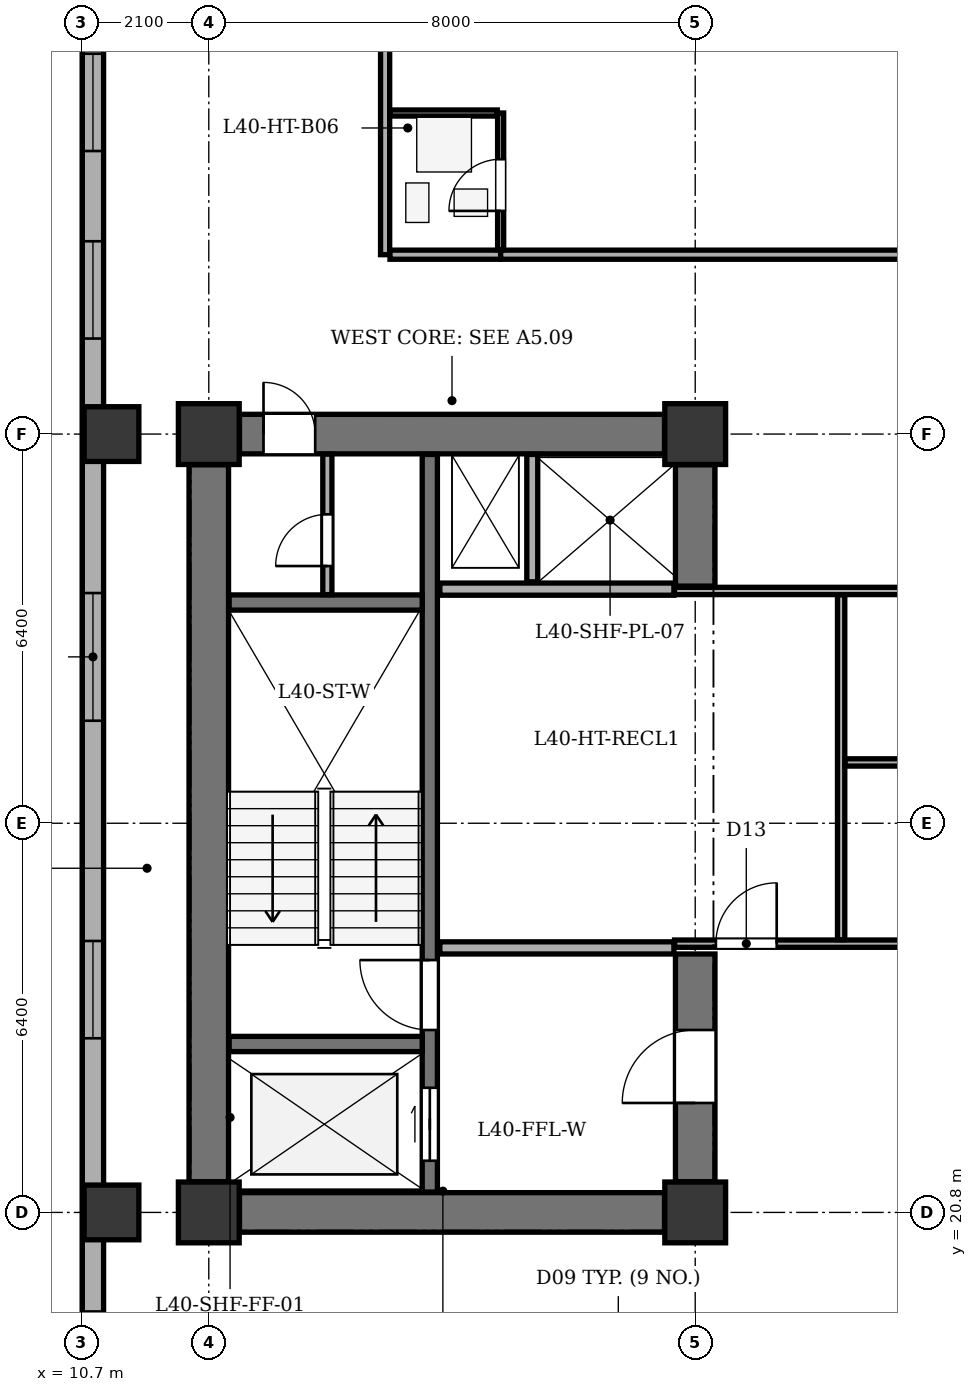
"""IFC4 building model, lengths in metres.
Left out: names, types, materials, properties, quantities, classifications, styles, units other than length and angle.
Written with IfcOpenShell. Run it as: python <this file> out.ifc"""

import sys

from ifc_helpers import new_model, si_unit, direction, frame, frame_2d, origin, origin_2d, place, context, subcontext, project, spatial, rectangle, extrude, element, fill, save


model = new_model("IFC4")
c1 = context("Model", 3, precision=1e-05, world=origin(), true_north=direction((0.0, 1.0)))
c2 = subcontext(c1, "Body", "Model", "MODEL_VIEW")
j1 = project(units=[si_unit("LENGTHUNIT", "METRE"), si_unit("PLANEANGLEUNIT", "RADIAN")], contexts=[c1])
p1 = place(None, origin())
s1 = spatial("IfcSite", under=j1, at=p1, CompositionType="ELEMENT")
p2 = place(p1, origin())
s2 = spatial("IfcBuilding", under=s1, at=p2, CompositionType="ELEMENT")
p3 = place(p2, frame((0.0, 0.0, 158.8)))
s3 = spatial("IfcBuildingStorey", under=s2, at=p3, CompositionType="ELEMENT", Elevation=158.8)
for number, where, z_axis, x_axis in (
    (1, (12.8, 20.8, 0.0), (0.0, 0.0, 1.0), (1.0, 0.0, 0.0)),
    (2, (20.8, 20.8, 0.0), (0.0, 0.0, 1.0), (1.0, 0.0, 0.0)),
    (3, (12.8, 33.6, 0.0), (0.0, 0.0, 1.0), (1.0, 0.0, 0.0)),
    (4, (20.8, 33.6, 0.0), (0.0, 0.0, 1.0), (1.0, 0.0, 0.0)),
):
    element("IfcColumn", number, at=place(p3, frame(where, z_axis=z_axis, x_axis=x_axis)), inside=s3, PredefinedType="COLUMN", context=c2, shape_type="SweptSolid", body=[
        extrude(rectangle(XDim=1.0, YDim=1.0, at=origin_2d()), origin(), (0.0, 0.0, 1.0), 3.5),
    ])
for number, where, z_axis, x_axis in (
    (5, (11.2, 20.8, 0.0), (0.0, 0.0, 1.0), (1.0, 0.0, 0.0)),
    (6, (11.2, 33.6, 0.0), (0.0, 0.0, 1.0), (1.0, 0.0, 0.0)),
):
    element("IfcColumn", number, at=place(p3, frame(where, z_axis=z_axis, x_axis=x_axis)), inside=s3, PredefinedType="COLUMN", context=c2, shape_type="SweptSolid", body=[
        extrude(rectangle(XDim=0.9, YDim=0.9, at=origin_2d()), origin(), (0.0, 0.0, 1.0), 3.5),
    ])
p4 = place(p3, frame((10.895, 6.5, 0.0), z_axis=(0.0, 0.0, 1.0), x_axis=(0.0, 1.0, 0.0)))
e7 = element("IfcWall", 7, at=p4, inside=s3, PredefinedType="STANDARD", context=c2, shape_type="SweptSolid", body=[
    extrude(rectangle(XDim=35.0, YDim=0.35, at=frame_2d((17.5, 0.0))), origin(), (0.0, 0.0, 1.0), 2.435),
])
p5 = place(p4, frame((2.513, 0.0, 0.75)))
e8 = element("IfcOpeningElement", 8, at=p5, cuts=e7, PredefinedType="OPENING", context=c2, shape_type="SweptSolid", body=[
    extrude(rectangle(XDim=1.6, YDim=1.565, at=frame_2d((0.8, 0.782))), frame((0.0, 0.185, 0.0), z_axis=(0.0, -1.0, 0.0), x_axis=(1.0, 0.0, 0.0)), (0.0, 0.0, 1.0), 0.37),
])
p6 = place(p4, frame((7.879, 0.0, 0.75)))
e9 = element("IfcOpeningElement", 9, at=p6, cuts=e7, PredefinedType="OPENING", context=c2, shape_type="SweptSolid", body=[
    extrude(rectangle(XDim=1.6, YDim=1.565, at=frame_2d((0.8, 0.782))), frame((0.0, 0.185, 0.0), z_axis=(0.0, -1.0, 0.0), x_axis=(1.0, 0.0, 0.0)), (0.0, 0.0, 1.0), 0.37),
])
p7 = place(p4, frame((11.071, 0.0, 0.75)))
e10 = element("IfcOpeningElement", 10, at=p7, cuts=e7, PredefinedType="OPENING", context=c2, shape_type="SweptSolid", body=[
    extrude(rectangle(XDim=1.6, YDim=1.565, at=frame_2d((0.8, 0.782))), frame((0.0, 0.185, 0.0), z_axis=(0.0, -1.0, 0.0), x_axis=(1.0, 0.0, 0.0)), (0.0, 0.0, 1.0), 0.37),
])
p8 = place(p4, frame((17.164, 0.0, 0.75)))
e11 = element("IfcOpeningElement", 11, at=p8, cuts=e7, PredefinedType="OPENING", context=c2, shape_type="SweptSolid", body=[
    extrude(rectangle(XDim=1.6, YDim=1.565, at=frame_2d((0.8, 0.782))), frame((0.0, 0.185, 0.0), z_axis=(0.0, -1.0, 0.0), x_axis=(1.0, 0.0, 0.0)), (0.0, 0.0, 1.0), 0.37),
])
p9 = place(p4, frame((22.386, 0.0, 0.75)))
e12 = element("IfcOpeningElement", 12, at=p9, cuts=e7, PredefinedType="OPENING", context=c2, shape_type="SweptSolid", body=[
    extrude(rectangle(XDim=2.1, YDim=1.565, at=frame_2d((1.05, 0.782))), frame((0.0, 0.185, 0.0), z_axis=(0.0, -1.0, 0.0), x_axis=(1.0, 0.0, 0.0)), (0.0, 0.0, 1.0), 0.37),
])
p10 = place(p4, frame((28.671, 0.0, 0.75)))
e13 = element("IfcOpeningElement", 13, at=p10, cuts=e7, PredefinedType="OPENING", context=c2, shape_type="SweptSolid", body=[
    extrude(rectangle(XDim=1.6, YDim=1.565, at=frame_2d((0.8, 0.782))), frame((0.0, 0.185, 0.0), z_axis=(0.0, -1.0, 0.0), x_axis=(1.0, 0.0, 0.0)), (0.0, 0.0, 1.0), 0.37),
])
p11 = place(p4, frame((31.755, 0.0, 0.75)))
e14 = element("IfcOpeningElement", 14, at=p11, cuts=e7, PredefinedType="OPENING", context=c2, shape_type="SweptSolid", body=[
    extrude(rectangle(XDim=1.6, YDim=1.565, at=frame_2d((0.8, 0.782))), frame((0.0, 0.185, 0.0), z_axis=(0.0, -1.0, 0.0), x_axis=(1.0, 0.0, 0.0)), (0.0, 0.0, 1.0), 0.37),
])
p12 = place(p3, frame((12.8, 21.305, 0.0), z_axis=(0.0, 0.0, 1.0), x_axis=(0.0, 1.0, 0.0)))
e15 = element("IfcWall", 15, at=p12, inside=s3, PredefinedType="SHEAR", context=c2, shape_type="SweptSolid", body=[
    extrude(rectangle(XDim=11.79, YDim=0.65, at=frame_2d((5.895, 0.0))), origin(), (0.0, 0.0, 1.0), 3.05),
])
p13 = place(p3, frame((13.305, 20.8, 0.0), z_axis=(0.0, 0.0, 1.0), x_axis=(1.0, 0.0, 0.0)))
e16 = element("IfcWall", 16, at=p13, inside=s3, PredefinedType="SHEAR", context=c2, shape_type="SweptSolid", body=[
    extrude(rectangle(XDim=6.99, YDim=0.65, at=frame_2d((3.495, 0.0))), origin(), (0.0, 0.0, 1.0), 3.05),
])
p14 = place(p3, frame((13.305, 33.6, 0.0), z_axis=(0.0, 0.0, 1.0), x_axis=(1.0, 0.0, 0.0)))
e17 = element("IfcWall", 17, at=p14, inside=s3, PredefinedType="SHEAR", context=c2, shape_type="SweptSolid", body=[
    extrude(rectangle(XDim=6.99, YDim=0.65, at=frame_2d((3.495, 0.0))), origin(), (0.0, 0.0, 1.0), 3.05),
])
p15 = place(p14, frame((0.395, 0.0, 0.0)))
e18 = element("IfcOpeningElement", 18, at=p15, cuts=e17, PredefinedType="OPENING", context=c2, shape_type="SweptSolid", body=[
    extrude(rectangle(XDim=0.85, YDim=2.02, at=frame_2d((0.425, 1.01))), frame((0.0, 0.335, 0.0), z_axis=(0.0, -1.0, 0.0), x_axis=(1.0, 0.0, 0.0)), (0.0, 0.0, 1.0), 0.67),
])
p16 = place(p3, frame((20.8, 21.305, 0.0), z_axis=(0.0, 0.0, 1.0), x_axis=(0.0, 1.0, 0.0)))
e19 = element("IfcWall", 19, at=p16, inside=s3, PredefinedType="SHEAR", context=c2, shape_type="SweptSolid", body=[
    extrude(rectangle(XDim=3.745, YDim=0.65, at=frame_2d((1.873, 0.0))), origin(), (0.0, 0.0, 1.0), 3.05),
])
p17 = place(p16, frame((1.295, 0.0, 0.0)))
e20 = element("IfcOpeningElement", 20, at=p17, cuts=e19, PredefinedType="OPENING", context=c2, shape_type="SweptSolid", body=[
    extrude(rectangle(XDim=1.2, YDim=2.15, at=frame_2d((0.6, 1.075))), frame((0.0, 0.335, 0.0), z_axis=(0.0, -1.0, 0.0), x_axis=(1.0, 0.0, 0.0)), (0.0, 0.0, 1.0), 0.67),
])
p18 = place(p3, frame((20.8, 31.1, 0.0), z_axis=(0.0, 0.0, 1.0), x_axis=(0.0, 1.0, 0.0)))
e21 = element("IfcWall", 21, at=p18, inside=s3, PredefinedType="SHEAR", context=c2, shape_type="SweptSolid", body=[
    extrude(rectangle(XDim=1.995, YDim=0.65, at=frame_2d((0.998, 0.0))), origin(), (0.0, 0.0, 1.0), 3.05),
])
p19 = place(p3, frame((16.435, 21.135, 0.0), z_axis=(0.0, 0.0, 1.0), x_axis=(0.0, 1.0, 0.0)))
e22 = element("IfcWall", 22, at=p19, inside=s3, PredefinedType="SHEAR", context=c2, shape_type="SweptSolid", body=[
    extrude(rectangle(XDim=12.13, YDim=0.25, at=frame_2d((6.065, 0.0))), origin(), (0.0, 0.0, 1.0), 3.05),
])
p20 = place(p19, frame((0.515, 0.0, 0.0)))
e23 = element("IfcOpeningElement", 23, at=p20, cuts=e22, PredefinedType="OPENING", context=c2, shape_type="SweptSolid", body=[
    extrude(rectangle(XDim=1.2, YDim=2.15, at=frame_2d((0.6, 1.075))), frame((0.0, 0.135, 0.0), z_axis=(0.0, -1.0, 0.0), x_axis=(1.0, 0.0, 0.0)), (0.0, 0.0, 1.0), 0.27),
])
p21 = place(p19, frame((2.665, 0.0, 0.0)))
e24 = element("IfcOpeningElement", 24, at=p21, cuts=e22, PredefinedType="OPENING", context=c2, shape_type="SweptSolid", body=[
    extrude(rectangle(XDim=1.15, YDim=2.15, at=frame_2d((0.575, 1.075))), frame((0.0, 0.135, 0.0), z_axis=(0.0, -1.0, 0.0), x_axis=(1.0, 0.0, 0.0)), (0.0, 0.0, 1.0), 0.27),
])
for number, where, z_axis, x_axis in (
    (25, (13.135, 23.57, 0.0), (0.0, 0.0, 1.0), (1.0, 0.0, 0.0)),
    (26, (13.135, 30.83, 0.0), (0.0, 0.0, 1.0), (1.0, 0.0, 0.0)),
):
    element("IfcWall", number, at=place(p3, frame(where, z_axis=z_axis, x_axis=x_axis)), inside=s3, PredefinedType="SHEAR", context=c2, shape_type="SweptSolid", body=[
        extrude(rectangle(XDim=3.175, YDim=0.25, at=frame_2d((1.587, 0.0))), origin(), (0.0, 0.0, 1.0), 3.05),
    ])
for number, where, z_axis, x_axis in (
    (27, (16.6, 25.15, 0.0), (0.0, 0.0, 1.0), (1.0, 0.0, 0.0)),
    (28, (16.6, 31.05, 0.0), (0.0, 0.0, 1.0), (1.0, 0.0, 0.0)),
):
    element("IfcWall", number, at=place(p3, frame(where, z_axis=z_axis, x_axis=x_axis)), inside=s3, PredefinedType="SOLIDWALL", context=c2, shape_type="SweptSolid", body=[
        extrude(rectangle(XDim=3.85, YDim=0.2, at=frame_2d((1.925, 0.0))), origin(), (0.0, 0.0, 1.0), 3.05),
    ])
p22 = place(p3, frame((18.12, 31.17, 0.0), z_axis=(0.0, 0.0, 1.0), x_axis=(0.0, 1.0, 0.0)))
e29 = element("IfcWall", 29, at=p22, inside=s3, PredefinedType="PARTITIONING", context=c2, shape_type="SweptSolid", body=[
    extrude(rectangle(XDim=2.095, YDim=0.18, at=frame_2d((1.047, 0.0))), origin(), (0.0, 0.0, 1.0), 3.05),
])
p23 = place(p3, frame((14.75, 30.96, 0.0), z_axis=(0.0, 0.0, 1.0), x_axis=(0.0, 1.0, 0.0)))
e30 = element("IfcWall", 30, at=p23, inside=s3, PredefinedType="PARTITIONING", context=c2, shape_type="SweptSolid", body=[
    extrude(rectangle(XDim=2.31, YDim=0.15, at=frame_2d((1.155, 0.0))), origin(), (0.0, 0.0, 1.0), 3.05),
])
p24 = place(p23, frame((0.47, 0.0, 0.0)))
e31 = element("IfcOpeningElement", 31, at=p24, cuts=e30, PredefinedType="OPENING", context=c2, shape_type="SweptSolid", body=[
    extrude(rectangle(XDim=0.85, YDim=2.02, at=frame_2d((0.425, 1.01))), frame((0.0, 0.085, 0.0), z_axis=(0.0, -1.0, 0.0), x_axis=(1.0, 0.0, 0.0)), (0.0, 0.0, 1.0), 0.17),
])
p25 = place(p3, frame((20.46, 25.22, 0.0), z_axis=(0.0, 0.0, 1.0), x_axis=(1.0, 0.0, 0.0)))
e32 = element("IfcWall", 32, at=p25, inside=s3, PredefinedType="PARTITIONING", context=c2, shape_type="SweptSolid", body=[
    extrude(rectangle(XDim=11.94, YDim=0.12, at=frame_2d((5.97, 0.0))), origin(), (0.0, 0.0, 1.0), 3.05),
])
p26 = place(p25, frame((0.68, 0.0, 0.0)))
e33 = element("IfcOpeningElement", 33, at=p26, cuts=e32, PredefinedType="OPENING", context=c2, shape_type="SweptSolid", body=[
    extrude(rectangle(XDim=1.0, YDim=2.1, at=frame_2d((0.5, 1.05))), frame((0.0, 0.07, 0.0), z_axis=(0.0, -1.0, 0.0), x_axis=(1.0, 0.0, 0.0)), (0.0, 0.0, 1.0), 0.14),
])
p27 = place(p3, frame((20.46, 31.02, 0.0), z_axis=(0.0, 0.0, 1.0), x_axis=(1.0, 0.0, 0.0)))
e34 = element("IfcWall", 34, at=p27, inside=s3, PredefinedType="PARTITIONING", context=c2, shape_type="SweptSolid", body=[
    extrude(rectangle(XDim=11.94, YDim=0.12, at=frame_2d((5.97, 0.0))), origin(), (0.0, 0.0, 1.0), 3.05),
])
p28 = place(p3, frame((23.2, 25.285, 0.0), z_axis=(0.0, 0.0, 1.0), x_axis=(0.0, 1.0, 0.0)))
e35 = element("IfcWall", 35, at=p28, inside=s3, PredefinedType="PARTITIONING", context=c2, shape_type="SweptSolid", body=[
    extrude(rectangle(XDim=5.67, YDim=0.12, at=frame_2d((2.835, 0.0))), origin(), (0.0, 0.0, 1.0), 3.05),
])
p29 = place(p3, frame((23.265, 28.2, 0.0), z_axis=(0.0, 0.0, 1.0), x_axis=(1.0, 0.0, 0.0)))
e36 = element("IfcWall", 36, at=p29, inside=s3, PredefinedType="PARTITIONING", context=c2, shape_type="SweptSolid", body=[
    extrude(rectangle(XDim=9.07, YDim=0.12, at=frame_2d((4.535, 0.0))), origin(), (0.0, 0.0, 1.0), 3.05),
])
p30 = place(p3, frame((15.7, 36.55, 0.0), z_axis=(0.0, 0.0, 1.0), x_axis=(0.0, 1.0, 0.0)))
e37 = element("IfcWall", 37, at=p30, inside=s3, PredefinedType="PARTITIONING", context=c2, shape_type="SweptSolid", body=[
    extrude(rectangle(XDim=9.575, YDim=0.15, at=frame_2d((4.788, 0.0))), origin(), (0.0, 0.0, 1.0), 1.635),
])
p31 = place(p3, frame((15.78, 36.55, 0.0), z_axis=(0.0, 0.0, 1.0), x_axis=(1.0, 0.0, 0.0)))
e38 = element("IfcWall", 38, at=p31, inside=s3, PredefinedType="PARTITIONING", context=c2, shape_type="SweptSolid", body=[
    extrude(rectangle(XDim=1.82, YDim=0.15, at=frame_2d((0.91, 0.0))), origin(), (0.0, 0.0, 1.0), 3.05),
])
p32 = place(p3, frame((17.6, 36.55, 0.0), z_axis=(0.0, 0.0, 1.0), x_axis=(1.0, 0.0, 0.0)))
e39 = element("IfcWall", 39, at=p32, inside=s3, PredefinedType="PARTITIONING", context=c2, shape_type="SweptSolid", body=[
    extrude(rectangle(XDim=14.984, YDim=0.15, at=frame_2d((7.492, 0.0))), origin(), (0.0, 0.0, 1.0), 3.05),
])
p33 = place(p32, frame((7.012, 0.0, 0.0)))
e40 = element("IfcOpeningElement", 40, at=p33, cuts=e39, PredefinedType="OPENING", context=c2, shape_type="SweptSolid", body=[
    extrude(rectangle(XDim=0.95, YDim=2.1, at=frame_2d((0.475, 1.05))), frame((0.0, 0.085, 0.0), z_axis=(0.0, -1.0, 0.0), x_axis=(1.0, 0.0, 0.0)), (0.0, 0.0, 1.0), 0.17),
])
p34 = place(p3, frame((17.6, 36.63, 0.0), z_axis=(0.0, 0.0, 1.0), x_axis=(0.0, 1.0, 0.0)))
e41 = element("IfcWall", 41, at=p34, inside=s3, PredefinedType="PARTITIONING", context=c2, shape_type="SweptSolid", body=[
    extrude(rectangle(XDim=2.25, YDim=0.1, at=frame_2d((1.125, 0.0))), origin(), (0.0, 0.0, 1.0), 3.05),
])
p35 = place(p34, frame((0.64, 0.0, 0.0)))
e42 = element("IfcOpeningElement", 42, at=p35, cuts=e41, PredefinedType="OPENING", context=c2, shape_type="SweptSolid", body=[
    extrude(rectangle(XDim=0.85, YDim=2.05, at=frame_2d((0.425, 1.025))), frame((0.0, 0.06, 0.0), z_axis=(0.0, -1.0, 0.0), x_axis=(1.0, 0.0, 0.0)), (0.0, 0.0, 1.0), 0.12),
])
p36 = place(p3, frame((15.78, 38.88, 0.0), z_axis=(0.0, 0.0, 1.0), x_axis=(1.0, 0.0, 0.0)))
e43 = element("IfcWall", 43, at=p36, inside=s3, PredefinedType="PARTITIONING", context=c2, shape_type="SweptSolid", body=[
    extrude(rectangle(XDim=1.765, YDim=0.1, at=frame_2d((0.882, 0.0))), origin(), (0.0, 0.0, 1.0), 3.05),
])
p37 = place(p7, origin())
e44 = element("IfcWindow", 44, at=p37, inside=s3, PartitioningType="SINGLE_PANEL", PredefinedType="WINDOW", context=c2, shape_type="SweptSolid", body=[
    extrude(rectangle(XDim=1.6, YDim=1.565, at=frame_2d((0.8, 0.782))), frame((0.0, -0.01, 0.0), z_axis=(0.0, -1.0, 0.0), x_axis=(1.0, 0.0, 0.0)), (0.0, 0.0, 1.0), 0.06),
])
fill(e10, e44)
p38 = place(p8, origin())
e45 = element("IfcWindow", 45, at=p38, inside=s3, PartitioningType="SINGLE_PANEL", PredefinedType="WINDOW", context=c2, shape_type="SweptSolid", body=[
    extrude(rectangle(XDim=1.6, YDim=1.565, at=frame_2d((0.8, 0.782))), frame((0.0, -0.01, 0.0), z_axis=(0.0, -1.0, 0.0), x_axis=(1.0, 0.0, 0.0)), (0.0, 0.0, 1.0), 0.06),
])
fill(e11, e45)
p39 = place(p9, origin())
e46 = element("IfcWindow", 46, at=p39, inside=s3, PartitioningType="SINGLE_PANEL", PredefinedType="WINDOW", context=c2, shape_type="SweptSolid", body=[
    extrude(rectangle(XDim=2.1, YDim=1.565, at=frame_2d((1.05, 0.782))), frame((0.0, -0.01, 0.0), z_axis=(0.0, -1.0, 0.0), x_axis=(1.0, 0.0, 0.0)), (0.0, 0.0, 1.0), 0.06),
])
fill(e12, e46)
p40 = place(p10, origin())
e47 = element("IfcWindow", 47, at=p40, inside=s3, PartitioningType="SINGLE_PANEL", PredefinedType="WINDOW", context=c2, shape_type="SweptSolid", body=[
    extrude(rectangle(XDim=1.6, YDim=1.565, at=frame_2d((0.8, 0.782))), frame((0.0, -0.01, 0.0), z_axis=(0.0, -1.0, 0.0), x_axis=(1.0, 0.0, 0.0)), (0.0, 0.0, 1.0), 0.06),
])
fill(e13, e47)
p41 = place(p11, origin())
e48 = element("IfcWindow", 48, at=p41, inside=s3, PartitioningType="SINGLE_PANEL", PredefinedType="WINDOW", context=c2, shape_type="SweptSolid", body=[
    extrude(rectangle(XDim=1.6, YDim=1.565, at=frame_2d((0.8, 0.782))), frame((0.0, -0.01, 0.0), z_axis=(0.0, -1.0, 0.0), x_axis=(1.0, 0.0, 0.0)), (0.0, 0.0, 1.0), 0.06),
])
fill(e14, e48)
p42 = place(p15, origin())
e49 = element("IfcDoor", 49, at=p42, inside=s3, OperationType="SINGLE_SWING_LEFT", PredefinedType="DOOR", context=c2, shape_type="SweptSolid", body=[
    extrude(rectangle(XDim=0.85, YDim=2.02, at=frame_2d((0.425, 1.01))), frame((0.0, 0.025, 0.0), z_axis=(0.0, -1.0, 0.0), x_axis=(1.0, 0.0, 0.0)), (0.0, 0.0, 1.0), 0.05),
])
fill(e18, e49)
p43 = place(p17, origin())
e50 = element("IfcDoor", 50, at=p43, inside=s3, OperationType="SINGLE_SWING_LEFT", PredefinedType="DOOR", context=c2, shape_type="SweptSolid", body=[
    extrude(rectangle(XDim=1.2, YDim=2.15, at=frame_2d((0.6, 1.075))), frame((0.0, 0.025, 0.0), z_axis=(0.0, -1.0, 0.0), x_axis=(1.0, 0.0, 0.0)), (0.0, 0.0, 1.0), 0.05),
])
fill(e20, e50)
p44 = place(p20, origin())
e51 = element("IfcDoor", 51, at=p44, inside=s3, OperationType="DOUBLE_DOOR_SLIDING", PredefinedType="DOOR", context=c2, shape_type="SweptSolid", body=[
    extrude(rectangle(XDim=1.2, YDim=2.15, at=frame_2d((0.6, 1.075))), frame((0.0, 0.025, 0.0), z_axis=(0.0, -1.0, 0.0), x_axis=(1.0, 0.0, 0.0)), (0.0, 0.0, 1.0), 0.05),
])
fill(e23, e51)
p45 = place(p21, origin())
e52 = element("IfcDoor", 52, at=p45, inside=s3, OperationType="SINGLE_SWING_RIGHT", PredefinedType="DOOR", context=c2, shape_type="SweptSolid", body=[
    extrude(rectangle(XDim=1.15, YDim=2.15, at=frame_2d((0.575, 1.075))), frame((0.0, 0.025, 0.0), z_axis=(0.0, -1.0, 0.0), x_axis=(1.0, 0.0, 0.0)), (0.0, 0.0, 1.0), 0.05),
])
fill(e24, e52)
p46 = place(p24, origin())
e53 = element("IfcDoor", 53, at=p46, inside=s3, OperationType="SINGLE_SWING_LEFT", PredefinedType="DOOR", context=c2, shape_type="SweptSolid", body=[
    extrude(rectangle(XDim=0.85, YDim=2.02, at=frame_2d((0.425, 1.01))), frame((0.0, 0.025, 0.0), z_axis=(0.0, -1.0, 0.0), x_axis=(1.0, 0.0, 0.0)), (0.0, 0.0, 1.0), 0.05),
])
fill(e31, e53)
p47 = place(p26, origin())
e54 = element("IfcDoor", 54, at=p47, inside=s3, OperationType="SINGLE_SWING_RIGHT", PredefinedType="DOOR", context=c2, shape_type="SweptSolid", body=[
    extrude(rectangle(XDim=1.0, YDim=2.1, at=frame_2d((0.5, 1.05))), frame((0.0, 0.025, 0.0), z_axis=(0.0, -1.0, 0.0), x_axis=(1.0, 0.0, 0.0)), (0.0, 0.0, 1.0), 0.05),
])
fill(e33, e54)
p48 = place(p35, origin())
e55 = element("IfcDoor", 55, at=p48, inside=s3, OperationType="SINGLE_SWING_LEFT", PredefinedType="DOOR", context=c2, shape_type="SweptSolid", body=[
    extrude(rectangle(XDim=0.85, YDim=2.05, at=frame_2d((0.425, 1.025))), frame((0.0, 0.025, 0.0), z_axis=(0.0, -1.0, 0.0), x_axis=(1.0, 0.0, 0.0)), (0.0, 0.0, 1.0), 0.05),
])
fill(e42, e55)
save(model, sys.argv[1])
